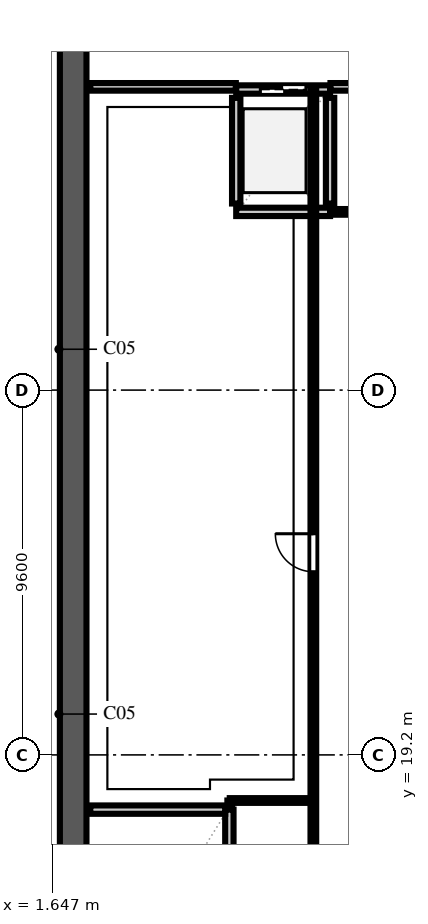
"""IFC4 building model, lengths in metres.
Left out: names, types, materials, properties, quantities, classifications, styles, units other than length and angle.
Written with IfcOpenShell. Run it as: python <this file> out.ifc"""

import sys

from ifc_helpers import new_model, si_unit, direction, frame, frame_2d, origin, place, context, subcontext, project, spatial, rectangle, extrude, element, fill, save


model = new_model("IFC4")
c1 = context("Model", 3, precision=1e-05, world=origin(), true_north=direction((0.0, 1.0)))
c2 = subcontext(c1, "Body", "Model", "MODEL_VIEW")
j1 = project(units=[si_unit("LENGTHUNIT", "METRE"), si_unit("PLANEANGLEUNIT", "RADIAN")], contexts=[c1])
p1 = place(None, origin())
s1 = spatial("IfcSite", under=j1, at=p1, CompositionType="ELEMENT")
p2 = place(p1, origin())
s2 = spatial("IfcBuilding", under=s1, at=p2, CompositionType="ELEMENT")
p3 = place(p2, frame((0.0, 0.0, 163.6)))
s3 = spatial("IfcBuildingStorey", under=s2, at=p3, CompositionType="ELEMENT", Elevation=163.6)
p4 = place(p3, frame((2.2, 9.25, 0.0), z_axis=(0.0, 0.0, 1.0), x_axis=(0.0, 1.0, 0.0)))
e1 = element("IfcWall", 1, at=p4, inside=s3, PredefinedType="SHEAR", context=c2, shape_type="SweptSolid", body=[
    extrude(rectangle(XDim=39.1, YDim=0.7, at=frame_2d((19.55, 0.0))), origin(), (0.0, 0.0, 1.0), 3.54),
])
p5 = place(p3, frame((6.31, 9.95, 0.0), z_axis=(0.0, 0.0, 1.0), x_axis=(0.0, 1.0, 0.0)))
e2 = element("IfcWall", 2, at=p5, inside=s3, PredefinedType="SOLIDWALL", context=c2, shape_type="SweptSolid", body=[
    extrude(rectangle(XDim=7.81, YDim=0.22, at=frame_2d((3.905, 0.0))), origin(), (0.0, 0.0, 1.0), 3.54),
])
p6 = place(p5, frame((0.14, 0.0, 0.0)))
e3 = element("IfcOpeningElement", 3, at=p6, cuts=e2, PredefinedType="OPENING", context=c2, shape_type="SweptSolid", body=[
    extrude(rectangle(XDim=1.1, YDim=2.2, at=frame_2d((0.55, 1.1))), frame((0.0, 0.122, 0.0), z_axis=(0.0, -1.0, 0.0), x_axis=(1.0, 0.0, 0.0)), (0.0, 0.0, 1.0), 0.244),
])
p7 = place(p3, frame((2.65, 17.76, 0.0), z_axis=(0.0, 0.0, 1.0), x_axis=(1.0, 0.0, 0.0)))
e4 = element("IfcWall", 4, at=p7, inside=s3, PredefinedType="SOLIDWALL", context=c2, shape_type="SweptSolid", body=[
    extrude(rectangle(XDim=3.55, YDim=0.22, at=frame_2d((1.775, 0.0))), origin(), (0.0, 0.0, 1.0), 3.54),
])
for number, where, z_axis, x_axis in (
    (5, (6.49, 33.71, 0.0), (0.0, 0.0, 1.0), (0.0, 1.0, 0.0)),
    (6, (8.96, 33.71, 0.0), (0.0, 0.0, 1.0), (0.0, 1.0, 0.0)),
):
    element("IfcWall", number, at=place(p3, frame(where, z_axis=z_axis, x_axis=x_axis)), inside=s3, PredefinedType="SOLIDWALL", context=c2, shape_type="SweptSolid", body=[
        extrude(rectangle(XDim=2.78, YDim=0.22, at=frame_2d((1.39, 0.0))), origin(), (0.0, 0.0, 1.0), 3.54),
    ])
p8 = place(p3, frame((6.49, 33.49, 0.0), z_axis=(0.0, 0.0, 1.0), x_axis=(1.0, 0.0, 0.0)))
e7 = element("IfcWall", 7, at=p8, inside=s3, PredefinedType="SOLIDWALL", context=c2, shape_type="SweptSolid", body=[
    extrude(rectangle(XDim=2.47, YDim=0.22, at=frame_2d((1.235, 0.0))), origin(), (0.0, 0.0, 1.0), 3.54),
])
p9 = place(p3, frame((6.49, 36.71, 0.0), z_axis=(0.0, 0.0, 1.0), x_axis=(1.0, 0.0, 0.0)))
e8 = element("IfcWall", 8, at=p9, inside=s3, PredefinedType="SOLIDWALL", context=c2, shape_type="SweptSolid", body=[
    extrude(rectangle(XDim=2.47, YDim=0.22, at=frame_2d((1.235, 0.0))), origin(), (0.0, 0.0, 1.0), 3.54),
])
p10 = place(p9, frame((0.635, 0.0, 0.0)))
e9 = element("IfcOpeningElement", 9, at=p10, cuts=e8, PredefinedType="OPENING", context=c2, shape_type="SweptSolid", body=[
    extrude(rectangle(XDim=1.2, YDim=2.2, at=frame_2d((0.6, 1.1))), frame((0.0, 0.122, 0.0), z_axis=(0.0, -1.0, 0.0), x_axis=(1.0, 0.0, 0.0)), (0.0, 0.0, 1.0), 0.244),
])
p11 = place(p3, frame((2.65, 36.78, 0.0), z_axis=(0.0, 0.0, 1.0), x_axis=(1.0, 0.0, 0.0)))
e10 = element("IfcWall", 10, at=p11, inside=s3, PredefinedType="SOLIDWALL", context=c2, shape_type="SweptSolid", body=[
    extrude(rectangle(XDim=3.83, YDim=0.2, at=frame_2d((1.915, 0.0))), origin(), (0.0, 0.0, 1.0), 3.54),
])
p12 = place(p3, frame((8.97, 36.78, 0.0), z_axis=(0.0, 0.0, 1.0), x_axis=(1.0, 0.0, 0.0)))
e11 = element("IfcWall", 11, at=p12, inside=s3, PredefinedType="SOLIDWALL", context=c2, shape_type="SweptSolid", body=[
    extrude(rectangle(XDim=1.51, YDim=0.2, at=frame_2d((0.755, 0.0))), origin(), (0.0, 0.0, 1.0), 3.54),
])
p13 = place(p3, frame((8.965, 33.49, 0.0), z_axis=(0.0, 0.0, 1.0), x_axis=(1.0, 0.0, 0.0)))
e12 = element("IfcWall", 12, at=p13, inside=s3, PredefinedType="PARTITIONING", context=c2, shape_type="SweptSolid", body=[
    extrude(rectangle(XDim=1.52, YDim=0.15, at=frame_2d((0.76, 0.0))), origin(), (0.0, 0.0, 1.0), 3.54),
])
p14 = place(p3, frame((6.32, 17.8, 0.0), z_axis=(0.0, 0.0, 1.0), x_axis=(0.0, 1.0, 0.0)))
e13 = element("IfcWall", 13, at=p14, inside=s3, PredefinedType="PARTITIONING", context=c2, shape_type="SweptSolid", body=[
    extrude(rectangle(XDim=0.2, YDim=0.125, at=frame_2d((0.1, 0.0))), origin(), (0.0, 0.0, 1.0), 3.54),
])
p15 = place(p3, frame((6.32, 18.0, 0.0), z_axis=(0.0, 0.0, 1.0), x_axis=(1.0, 0.0, 0.0)))
e14 = element("IfcWall", 14, at=p15, inside=s3, PredefinedType="PARTITIONING", context=c2, shape_type="SweptSolid", body=[
    extrude(rectangle(XDim=2.2, YDim=0.125, at=frame_2d((1.1, 0.0))), origin(), (0.0, 0.0, 1.0), 3.54),
])
p16 = place(p3, frame((8.52, 12.02, 0.0), z_axis=(0.0, 0.0, 1.0), x_axis=(0.0, 1.0, 0.0)))
e15 = element("IfcWall", 15, at=p16, inside=s3, PredefinedType="PARTITIONING", context=c2, shape_type="SweptSolid", body=[
    extrude(rectangle(XDim=24.76, YDim=0.15, at=frame_2d((12.38, 0.0))), origin(), (0.0, 0.0, 1.0), 3.54),
])
p17 = place(p16, frame((2.0, 0.0, 0.0)))
e16 = element("IfcOpeningElement", 16, at=p17, cuts=e15, PredefinedType="OPENING", context=c2, shape_type="SweptSolid", body=[
    extrude(rectangle(XDim=0.85, YDim=2.1, at=frame_2d((0.425, 1.05))), frame((0.0, 0.087, 0.0), z_axis=(0.0, -1.0, 0.0), x_axis=(1.0, 0.0, 0.0)), (0.0, 0.0, 1.0), 0.174),
])
p18 = place(p16, frame((12.0, 0.0, 0.0)))
e17 = element("IfcOpeningElement", 17, at=p18, cuts=e15, PredefinedType="OPENING", context=c2, shape_type="SweptSolid", body=[
    extrude(rectangle(XDim=1.0, YDim=2.2, at=frame_2d((0.5, 1.1))), frame((0.0, 0.087, 0.0), z_axis=(0.0, -1.0, 0.0), x_axis=(1.0, 0.0, 0.0)), (0.0, 0.0, 1.0), 0.174),
])
p19 = place(p10, origin())
e18 = element("IfcDoor", 18, at=p19, inside=s3, OperationType="DOUBLE_DOOR_SLIDING", PredefinedType="DOOR", context=c2, shape_type="SweptSolid", body=[
    extrude(rectangle(XDim=1.2, YDim=2.2, at=frame_2d((0.6, 1.1))), frame((0.0, 0.025, 0.0), z_axis=(0.0, -1.0, 0.0), x_axis=(1.0, 0.0, 0.0)), (0.0, 0.0, 1.0), 0.05),
])
fill(e9, e18)
p20 = place(p18, origin())
e19 = element("IfcDoor", 19, at=p20, inside=s3, OperationType="SINGLE_SWING_RIGHT", PredefinedType="DOOR", context=c2, shape_type="SweptSolid", body=[
    extrude(rectangle(XDim=1.0, YDim=2.2, at=frame_2d((0.5, 1.1))), frame((0.0, 0.025, 0.0), z_axis=(0.0, -1.0, 0.0), x_axis=(1.0, 0.0, 0.0)), (0.0, 0.0, 1.0), 0.05),
])
fill(e17, e19)
save(model, sys.argv[1])
